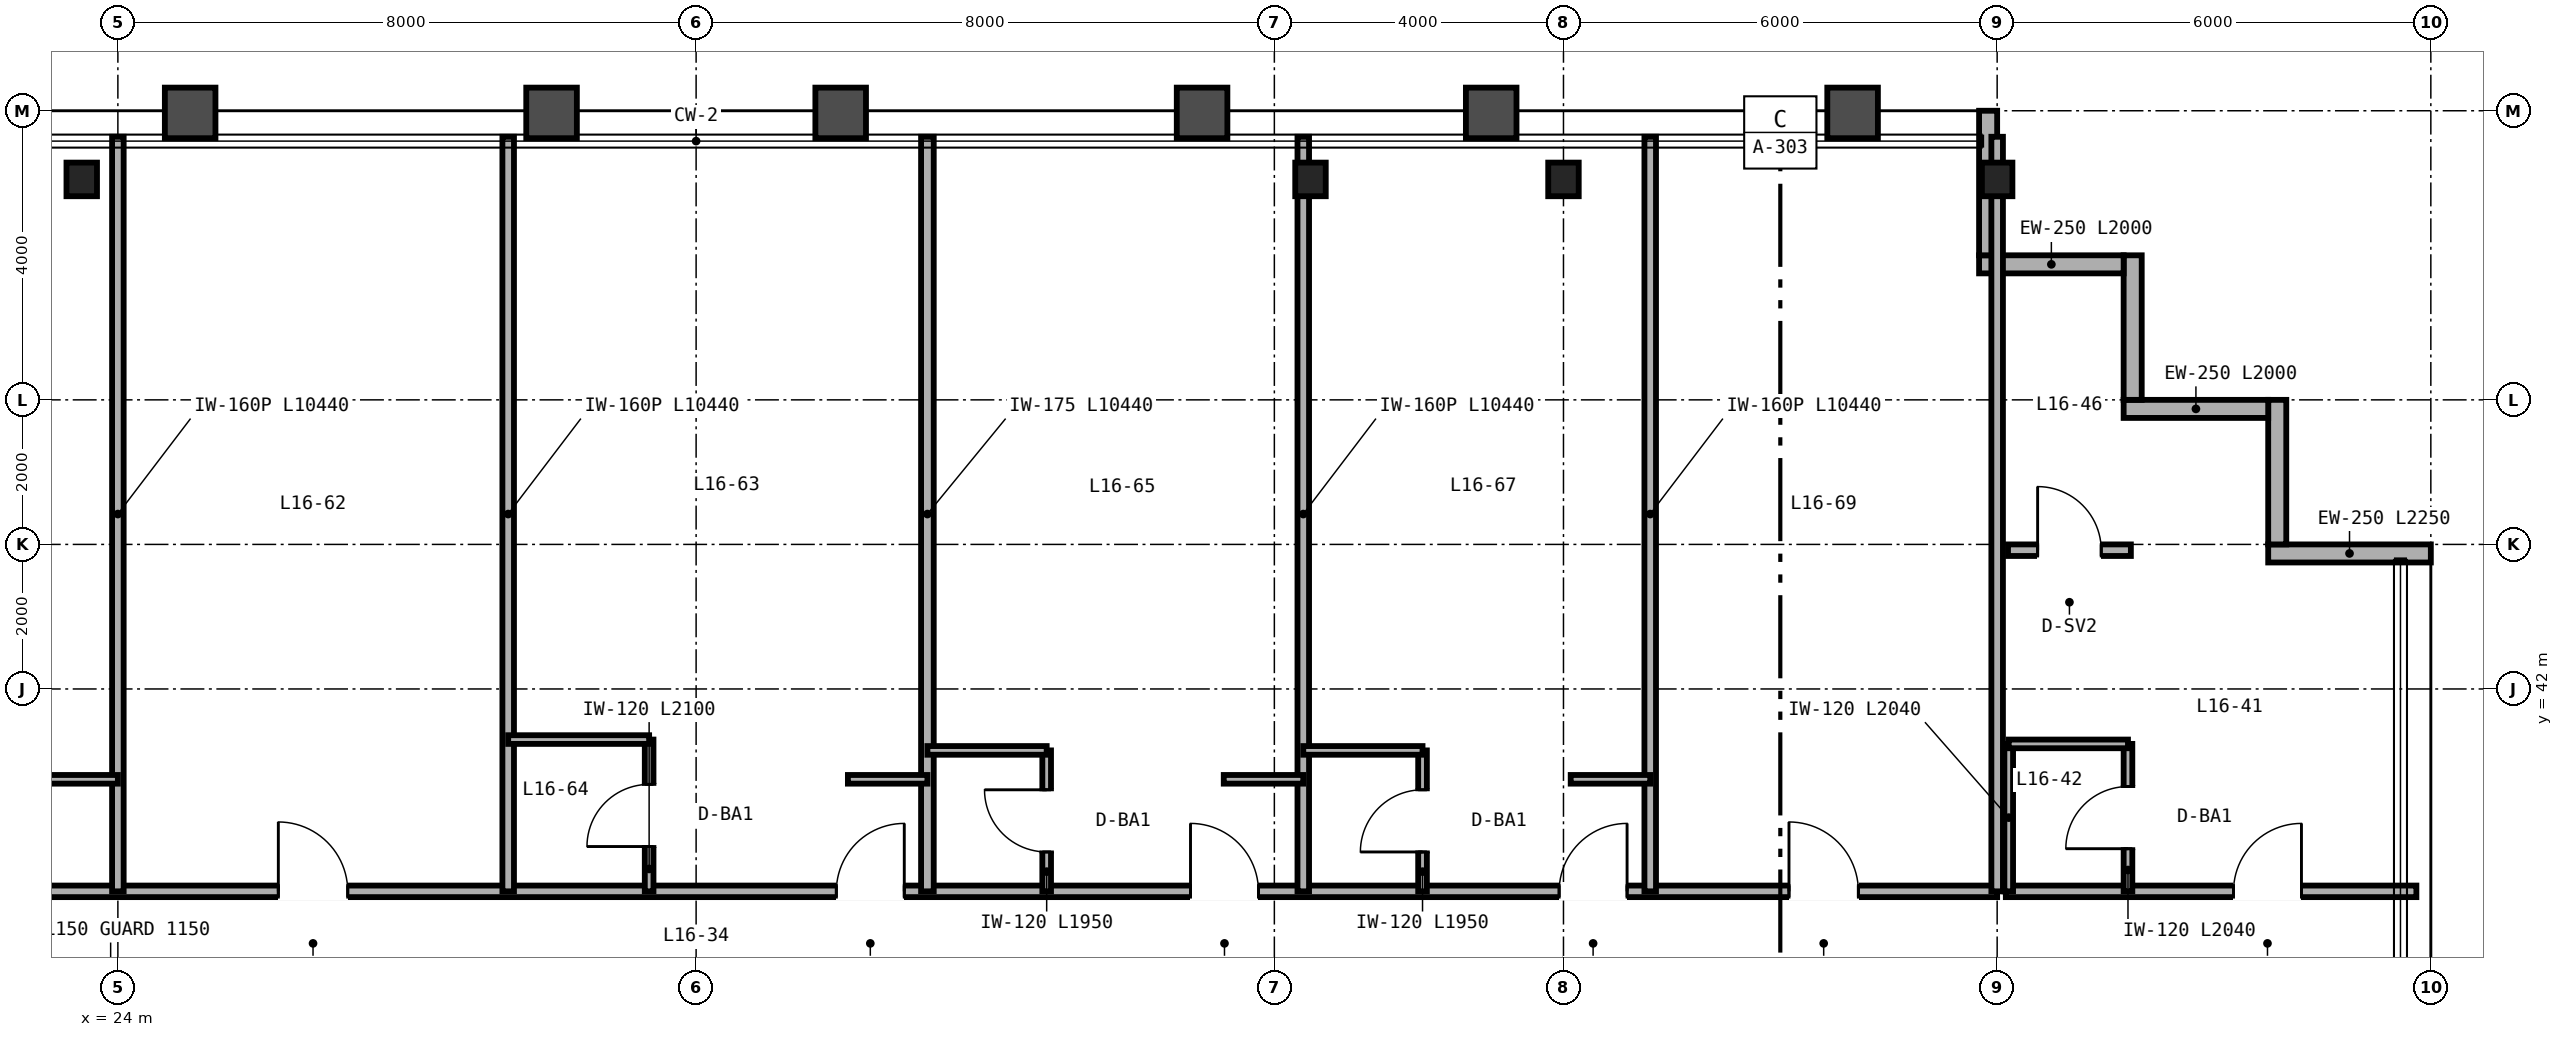
"""IFC4 building model, lengths in metres.
Left out: names, types, materials, properties, quantities, classifications, styles, units other than length and angle.
Written with IfcOpenShell. Run it as: python <this file> out.ifc"""

import sys

from ifc_helpers import new_model, si_unit, direction, frame, frame_2d, origin, origin_2d, place, context, subcontext, project, spatial, rectangle, i_section, extrude, source, transform, mapped, element, fill, save


model = new_model("IFC4")
c1 = context("Model", 3, precision=1e-05, world=origin(), true_north=direction((0.0, 1.0)))
c2 = subcontext(c1, "Body", "Model", "MODEL_VIEW")
j1 = project(units=[si_unit("LENGTHUNIT", "METRE"), si_unit("PLANEANGLEUNIT", "RADIAN")], contexts=[c1])
p1 = place(None, origin())
s1 = spatial("IfcSite", under=j1, at=p1, CompositionType="ELEMENT")
p2 = place(p1, origin())
s2 = spatial("IfcBuilding", under=s1, at=p2, CompositionType="ELEMENT")
p3 = place(p2, frame((0.0, 0.0, 67.2)))
s3 = spatial("IfcBuildingStorey", under=s2, at=p3, CompositionType="ELEMENT", Elevation=67.2)
m1 = source(origin(), c2, "Body", "SweptSolid", [
    extrude(i_section(OverallWidth=0.422, OverallDepth=0.465, WebThickness=0.045, FlangeThickness=0.073, FilletRadius=0.025, at=origin_2d()), origin(), (0.0, 0.0, 1.0), 3.35),
])
for number, where, z_axis, x_axis in (
    (1, (23.5, 49.05, 0.0), (0.0, 0.0, 1.0), (1.0, 0.0, 0.0)),
    (2, (40.5, 49.05, 0.0), (0.0, 0.0, 1.0), (1.0, 0.0, 0.0)),
    (3, (44.0, 49.05, 0.0), (0.0, 0.0, 1.0), (1.0, 0.0, 0.0)),
    (4, (50.0, 49.05, 0.0), (0.0, 0.0, 1.0), (1.0, 0.0, 0.0)),
):
    element("IfcColumn", number, at=place(p3, frame(where, z_axis=z_axis, x_axis=x_axis)), inside=s3, PredefinedType="COLUMN", context=c2, shape_type="MappedRepresentation", body=[
        mapped(m1, transform((0.0, 0.0, 0.0), scale=1.0)),
    ])
p4 = place(p3, frame((56.0, 43.875, 0.0), z_axis=(0.0, 0.0, 1.0), x_axis=(-1.0, 0.0, 0.0)))
e5 = element("IfcWall", 5, at=p4, inside=s3, PredefinedType="SOLIDWALL", context=c2, shape_type="SweptSolid", body=[
    extrude(rectangle(XDim=2.25, YDim=0.25, at=frame_2d((1.125, 0.0))), origin(), (0.0, 0.0, 1.0), 3.35),
])
for number, where, z_axis, x_axis in (
    (6, (53.875, 44.0, 0.0), (0.0, 0.0, 1.0), (0.0, 1.0, 0.0)),
    (7, (53.75, 45.875, 0.0), (0.0, 0.0, 1.0), (-1.0, 0.0, 0.0)),
    (8, (51.875, 46.0, 0.0), (0.0, 0.0, 1.0), (0.0, 1.0, 0.0)),
    (9, (51.75, 47.875, 0.0), (0.0, 0.0, 1.0), (-1.0, 0.0, 0.0)),
):
    element("IfcWall", number, at=place(p3, frame(where, z_axis=z_axis, x_axis=x_axis)), inside=s3, PredefinedType="SOLIDWALL", context=c2, shape_type="SweptSolid", body=[
        extrude(rectangle(XDim=2.0, YDim=0.25, at=frame_2d((1.0, 0.0))), origin(), (0.0, 0.0, 1.0), 3.35),
    ])
p5 = place(p3, frame((49.875, 48.0, 0.0), z_axis=(0.0, 0.0, 1.0), x_axis=(0.0, 1.0, 0.0)))
e10 = element("IfcWall", 10, at=p5, inside=s3, PredefinedType="SOLIDWALL", context=c2, shape_type="SweptSolid", body=[
    extrude(rectangle(XDim=2.0, YDim=0.25, at=frame_2d((1.0, 0.0))), origin(), (0.0, 0.0, 1.0), 2.657),
])
p6 = place(p3, frame((50.12, 39.2, 0.0), z_axis=(0.0, 0.0, 1.0), x_axis=(1.0, 0.0, 0.0)))
e11 = element("IfcWall", 11, at=p6, inside=s3, PredefinedType="PARTITIONING", context=c2, shape_type="SweptSolid", body=[
    extrude(rectangle(XDim=5.68, YDim=0.16, at=frame_2d((2.84, 0.0))), origin(), (0.0, 0.0, 1.0), 3.35),
])
p7 = place(p6, frame((3.15, 0.0, 0.0)))
e12 = element("IfcOpeningElement", 12, at=p7, cuts=e11, PredefinedType="OPENING", context=c2, shape_type="SweptSolid", body=[
    extrude(rectangle(XDim=0.94, YDim=2.15, at=frame_2d((0.47, 1.075))), frame((0.0, 0.09, 0.0), z_axis=(0.0, -1.0, 0.0), x_axis=(1.0, 0.0, 0.0)), (0.0, 0.0, 1.0), 0.18),
])
p8 = place(p3, frame((51.81, 39.2, 0.0), z_axis=(0.0, 0.0, 1.0), x_axis=(0.0, 1.0, 0.0)))
e13 = element("IfcWall", 13, at=p8, inside=s3, PredefinedType="PARTITIONING", context=c2, shape_type="SweptSolid", body=[
    extrude(rectangle(XDim=2.04, YDim=0.12, at=frame_2d((1.02, 0.0))), origin(), (0.0, 0.0, 1.0), 3.35),
])
p9 = place(p8, frame((0.59, 0.0, 0.0)))
e14 = element("IfcOpeningElement", 14, at=p9, cuts=e13, PredefinedType="OPENING", context=c2, shape_type="SweptSolid", body=[
    extrude(rectangle(XDim=0.86, YDim=2.1, at=frame_2d((0.43, 1.05))), frame((0.0, 0.07, 0.0), z_axis=(0.0, -1.0, 0.0), x_axis=(1.0, 0.0, 0.0)), (0.0, 0.0, 1.0), 0.14),
])
p10 = place(p3, frame((50.16, 39.2, 0.0), z_axis=(0.0, 0.0, 1.0), x_axis=(0.0, 1.0, 0.0)))
e15 = element("IfcWall", 15, at=p10, inside=s3, PredefinedType="PARTITIONING", context=c2, shape_type="SweptSolid", body=[
    extrude(rectangle(XDim=2.04, YDim=0.12, at=frame_2d((1.02, 0.0))), origin(), (0.0, 0.0, 1.0), 3.35),
])
p11 = place(p3, frame((50.16, 41.24, 0.0), z_axis=(0.0, 0.0, 1.0), x_axis=(1.0, 0.0, 0.0)))
e16 = element("IfcWall", 16, at=p11, inside=s3, PredefinedType="PARTITIONING", context=c2, shape_type="SweptSolid", body=[
    extrude(rectangle(XDim=1.65, YDim=0.12, at=frame_2d((0.825, 0.0))), origin(), (0.0, 0.0, 1.0), 3.35),
])
p12 = place(p3, frame((50.15, 43.92, 0.0), z_axis=(0.0, 0.0, 1.0), x_axis=(1.0, 0.0, 0.0)))
e17 = element("IfcWall", 17, at=p12, inside=s3, PredefinedType="PARTITIONING", context=c2, shape_type="SweptSolid", body=[
    extrude(rectangle(XDim=1.7, YDim=0.16, at=frame_2d((0.85, 0.0))), origin(), (0.0, 0.0, 1.0), 3.35),
])
p13 = place(p12, frame((0.41, 0.0, 0.0)))
e18 = element("IfcOpeningElement", 18, at=p13, cuts=e17, PredefinedType="OPENING", context=c2, shape_type="SweptSolid", body=[
    extrude(rectangle(XDim=0.88, YDim=2.15, at=frame_2d((0.44, 1.075))), frame((0.0, 0.09, 0.0), z_axis=(0.0, -1.0, 0.0), x_axis=(1.0, 0.0, 0.0)), (0.0, 0.0, 1.0), 0.18),
])
p14 = place(p3, frame((14.0, 39.2, 0.0), z_axis=(0.0, 0.0, 1.0), x_axis=(1.0, 0.0, 0.0)))
e19 = element("IfcWall", 19, at=p14, inside=s3, PredefinedType="PARTITIONING", context=c2, shape_type="SweptSolid", body=[
    extrude(rectangle(XDim=36.0, YDim=0.16, at=frame_2d((18.0, 0.0))), origin(), (0.0, 0.0, 1.0), 2.571),
])
p15 = place(p14, frame((3.74, 0.0, 0.0)))
e20 = element("IfcOpeningElement", 20, at=p15, cuts=e19, PredefinedType="OPENING", context=c2, shape_type="SweptSolid", body=[
    extrude(rectangle(XDim=0.94, YDim=2.15, at=frame_2d((0.47, 1.075))), frame((0.0, 0.09, 0.0), z_axis=(0.0, -1.0, 0.0), x_axis=(1.0, 0.0, 0.0)), (0.0, 0.0, 1.0), 0.18),
])
p16 = place(p14, frame((7.79, 0.0, 0.0)))
e21 = element("IfcOpeningElement", 21, at=p16, cuts=e19, PredefinedType="OPENING", context=c2, shape_type="SweptSolid", body=[
    extrude(rectangle(XDim=0.94, YDim=2.15, at=frame_2d((0.47, 1.075))), frame((0.0, 0.09, 0.0), z_axis=(0.0, -1.0, 0.0), x_axis=(1.0, 0.0, 0.0)), (0.0, 0.0, 1.0), 0.18),
])
p17 = place(p14, frame((12.22, 0.0, 0.0)))
e22 = element("IfcOpeningElement", 22, at=p17, cuts=e19, PredefinedType="OPENING", context=c2, shape_type="SweptSolid", body=[
    extrude(rectangle(XDim=0.96, YDim=2.15, at=frame_2d((0.48, 1.075))), frame((0.0, 0.09, 0.0), z_axis=(0.0, -1.0, 0.0), x_axis=(1.0, 0.0, 0.0)), (0.0, 0.0, 1.0), 0.18),
])
p18 = place(p14, frame((19.94, 0.0, 0.0)))
e23 = element("IfcOpeningElement", 23, at=p18, cuts=e19, PredefinedType="OPENING", context=c2, shape_type="SweptSolid", body=[
    extrude(rectangle(XDim=0.94, YDim=2.15, at=frame_2d((0.47, 1.075))), frame((0.0, 0.09, 0.0), z_axis=(0.0, -1.0, 0.0), x_axis=(1.0, 0.0, 0.0)), (0.0, 0.0, 1.0), 0.18),
])
p19 = place(p14, frame((24.84, 0.0, 0.0)))
e24 = element("IfcOpeningElement", 24, at=p19, cuts=e19, PredefinedType="OPENING", context=c2, shape_type="SweptSolid", body=[
    extrude(rectangle(XDim=0.94, YDim=2.15, at=frame_2d((0.47, 1.075))), frame((0.0, 0.09, 0.0), z_axis=(0.0, -1.0, 0.0), x_axis=(1.0, 0.0, 0.0)), (0.0, 0.0, 1.0), 0.18),
])
p20 = place(p14, frame((29.94, 0.0, 0.0)))
e25 = element("IfcOpeningElement", 25, at=p20, cuts=e19, PredefinedType="OPENING", context=c2, shape_type="SweptSolid", body=[
    extrude(rectangle(XDim=0.94, YDim=2.15, at=frame_2d((0.47, 1.075))), frame((0.0, 0.09, 0.0), z_axis=(0.0, -1.0, 0.0), x_axis=(1.0, 0.0, 0.0)), (0.0, 0.0, 1.0), 0.18),
])
p21 = place(p14, frame((33.12, 0.0, 0.0)))
e26 = element("IfcOpeningElement", 26, at=p21, cuts=e19, PredefinedType="OPENING", context=c2, shape_type="SweptSolid", body=[
    extrude(rectangle(XDim=0.96, YDim=2.15, at=frame_2d((0.48, 1.075))), frame((0.0, 0.09, 0.0), z_axis=(0.0, -1.0, 0.0), x_axis=(1.0, 0.0, 0.0)), (0.0, 0.0, 1.0), 0.18),
])
p22 = place(p3, frame((50.0, 39.2, 0.0), z_axis=(0.0, 0.0, 1.0), x_axis=(0.0, 1.0, 0.0)))
e27 = element("IfcWall", 27, at=p22, inside=s3, PredefinedType="PARTITIONING", context=c2, shape_type="SweptSolid", body=[
    extrude(rectangle(XDim=10.44, YDim=0.16, at=frame_2d((5.22, 0.0))), origin(), (0.0, 0.0, 1.0), 2.657),
])
p23 = place(p3, frame((24.0, 39.2, 0.0), z_axis=(0.0, 0.0, 1.0), x_axis=(0.0, 1.0, 0.0)))
e28 = element("IfcWall", 28, at=p23, inside=s3, PredefinedType="PARTITIONING", context=c2, shape_type="SweptSolid", body=[
    extrude(rectangle(XDim=10.44, YDim=0.16, at=frame_2d((5.22, 0.0))), origin(), (0.0, 0.0, 1.0), 2.423),
])
p24 = place(p3, frame((22.9, 40.75, 0.0), z_axis=(0.0, 0.0, 1.0), x_axis=(1.0, 0.0, 0.0)))
e29 = element("IfcWall", 29, at=p24, inside=s3, PredefinedType="PARTITIONING", context=c2, shape_type="SweptSolid", body=[
    extrude(rectangle(XDim=1.1, YDim=0.12, at=frame_2d((0.55, 0.0))), origin(), (0.0, 0.0, 1.0), 2.571),
])
p25 = place(p3, frame((29.4, 39.2, 0.0), z_axis=(0.0, 0.0, 1.0), x_axis=(0.0, 1.0, 0.0)))
e30 = element("IfcWall", 30, at=p25, inside=s3, PredefinedType="PARTITIONING", context=c2, shape_type="SweptSolid", body=[
    extrude(rectangle(XDim=10.44, YDim=0.16, at=frame_2d((5.22, 0.0))), origin(), (0.0, 0.0, 1.0), 2.423),
])
p26 = place(p3, frame((35.2, 39.2, 0.0), z_axis=(0.0, 0.0, 1.0), x_axis=(0.0, 1.0, 0.0)))
e31 = element("IfcWall", 31, at=p26, inside=s3, PredefinedType="PARTITIONING", context=c2, shape_type="SweptSolid", body=[
    extrude(rectangle(XDim=10.44, YDim=0.175, at=frame_2d((5.22, 0.0))), origin(), (0.0, 0.0, 1.0), 2.423),
])
p27 = place(p3, frame((31.35, 39.2, 0.0), z_axis=(0.0, 0.0, 1.0), x_axis=(0.0, 1.0, 0.0)))
e32 = element("IfcWall", 32, at=p27, inside=s3, PredefinedType="PARTITIONING", context=c2, shape_type="SweptSolid", body=[
    extrude(rectangle(XDim=2.1, YDim=0.12, at=frame_2d((1.05, 0.0))), origin(), (0.0, 0.0, 1.0), 3.35),
])
p28 = place(p27, frame((0.62, 0.0, 0.0)))
e33 = element("IfcOpeningElement", 33, at=p28, cuts=e32, PredefinedType="OPENING", context=c2, shape_type="SweptSolid", body=[
    extrude(rectangle(XDim=0.86, YDim=2.1, at=frame_2d((0.43, 1.05))), frame((0.0, 0.07, 0.0), z_axis=(0.0, -1.0, 0.0), x_axis=(1.0, 0.0, 0.0)), (0.0, 0.0, 1.0), 0.14),
])
p29 = place(p3, frame((29.4, 41.3, 0.0), z_axis=(0.0, 0.0, 1.0), x_axis=(1.0, 0.0, 0.0)))
e34 = element("IfcWall", 34, at=p29, inside=s3, PredefinedType="PARTITIONING", context=c2, shape_type="SweptSolid", body=[
    extrude(rectangle(XDim=1.95, YDim=0.12, at=frame_2d((0.975, 0.0))), origin(), (0.0, 0.0, 1.0), 3.35),
])
p30 = place(p3, frame((34.1, 40.75, 0.0), z_axis=(0.0, 0.0, 1.0), x_axis=(1.0, 0.0, 0.0)))
e35 = element("IfcWall", 35, at=p30, inside=s3, PredefinedType="PARTITIONING", context=c2, shape_type="SweptSolid", body=[
    extrude(rectangle(XDim=1.1, YDim=0.12, at=frame_2d((0.55, 0.0))), origin(), (0.0, 0.0, 1.0), 3.35),
])
p31 = place(p3, frame((40.4, 39.2, 0.0), z_axis=(0.0, 0.0, 1.0), x_axis=(0.0, 1.0, 0.0)))
e36 = element("IfcWall", 36, at=p31, inside=s3, PredefinedType="PARTITIONING", context=c2, shape_type="SweptSolid", body=[
    extrude(rectangle(XDim=10.44, YDim=0.16, at=frame_2d((5.22, 0.0))), origin(), (0.0, 0.0, 1.0), 2.423),
])
p32 = place(p3, frame((36.85, 39.2, 0.0), z_axis=(0.0, 0.0, 1.0), x_axis=(0.0, 1.0, 0.0)))
e37 = element("IfcWall", 37, at=p32, inside=s3, PredefinedType="PARTITIONING", context=c2, shape_type="SweptSolid", body=[
    extrude(rectangle(XDim=1.95, YDim=0.12, at=frame_2d((0.975, 0.0))), origin(), (0.0, 0.0, 1.0), 3.35),
])
p33 = place(p32, frame((0.545, 0.0, 0.0)))
e38 = element("IfcOpeningElement", 38, at=p33, cuts=e37, PredefinedType="OPENING", context=c2, shape_type="SweptSolid", body=[
    extrude(rectangle(XDim=0.86, YDim=2.1, at=frame_2d((0.43, 1.05))), frame((0.0, 0.07, 0.0), z_axis=(0.0, -1.0, 0.0), x_axis=(1.0, 0.0, 0.0)), (0.0, 0.0, 1.0), 0.14),
])
p34 = place(p3, frame((35.2, 41.15, 0.0), z_axis=(0.0, 0.0, 1.0), x_axis=(1.0, 0.0, 0.0)))
e39 = element("IfcWall", 39, at=p34, inside=s3, PredefinedType="PARTITIONING", context=c2, shape_type="SweptSolid", body=[
    extrude(rectangle(XDim=1.65, YDim=0.12, at=frame_2d((0.825, 0.0))), origin(), (0.0, 0.0, 1.0), 3.35),
])
p35 = place(p3, frame((39.3, 40.75, 0.0), z_axis=(0.0, 0.0, 1.0), x_axis=(1.0, 0.0, 0.0)))
e40 = element("IfcWall", 40, at=p35, inside=s3, PredefinedType="PARTITIONING", context=c2, shape_type="SweptSolid", body=[
    extrude(rectangle(XDim=1.1, YDim=0.12, at=frame_2d((0.55, 0.0))), origin(), (0.0, 0.0, 1.0), 2.571),
])
p36 = place(p3, frame((45.2, 39.2, 0.0), z_axis=(0.0, 0.0, 1.0), x_axis=(0.0, 1.0, 0.0)))
e41 = element("IfcWall", 41, at=p36, inside=s3, PredefinedType="PARTITIONING", context=c2, shape_type="SweptSolid", body=[
    extrude(rectangle(XDim=10.44, YDim=0.16, at=frame_2d((5.22, 0.0))), origin(), (0.0, 0.0, 1.0), 2.657),
])
p37 = place(p3, frame((42.05, 39.2, 0.0), z_axis=(0.0, 0.0, 1.0), x_axis=(0.0, 1.0, 0.0)))
e42 = element("IfcWall", 42, at=p37, inside=s3, PredefinedType="PARTITIONING", context=c2, shape_type="SweptSolid", body=[
    extrude(rectangle(XDim=1.95, YDim=0.12, at=frame_2d((0.975, 0.0))), origin(), (0.0, 0.0, 1.0), 3.35),
])
p38 = place(p37, frame((0.545, 0.0, 0.0)))
e43 = element("IfcOpeningElement", 43, at=p38, cuts=e42, PredefinedType="OPENING", context=c2, shape_type="SweptSolid", body=[
    extrude(rectangle(XDim=0.86, YDim=2.1, at=frame_2d((0.43, 1.05))), frame((0.0, 0.07, 0.0), z_axis=(0.0, -1.0, 0.0), x_axis=(1.0, 0.0, 0.0)), (0.0, 0.0, 1.0), 0.14),
])
p39 = place(p3, frame((40.4, 41.15, 0.0), z_axis=(0.0, 0.0, 1.0), x_axis=(1.0, 0.0, 0.0)))
e44 = element("IfcWall", 44, at=p39, inside=s3, PredefinedType="PARTITIONING", context=c2, shape_type="SweptSolid", body=[
    extrude(rectangle(XDim=1.65, YDim=0.12, at=frame_2d((0.825, 0.0))), origin(), (0.0, 0.0, 1.0), 2.571),
])
p40 = place(p3, frame((44.1, 40.75, 0.0), z_axis=(0.0, 0.0, 1.0), x_axis=(1.0, 0.0, 0.0)))
e45 = element("IfcWall", 45, at=p40, inside=s3, PredefinedType="PARTITIONING", context=c2, shape_type="SweptSolid", body=[
    extrude(rectangle(XDim=1.1, YDim=0.12, at=frame_2d((0.55, 0.0))), origin(), (0.0, 0.0, 1.0), 3.35),
])
m2 = source(origin(), c2, "Body", "SweptSolid", [
    extrude(rectangle(XDim=0.86, YDim=2.1, at=frame_2d((0.43, 1.05))), frame((0.0, 0.025, 0.0), z_axis=(0.0, -1.0, 0.0), x_axis=(1.0, 0.0, 0.0)), (0.0, 0.0, 1.0), 0.05),
])
p41 = place(p9, origin())
e46 = element("IfcDoor", 46, at=p41, inside=s3, OperationType="SINGLE_SWING_LEFT", PredefinedType="DOOR", context=c2, shape_type="MappedRepresentation", body=[
    mapped(m2, transform((0.0, 0.0, 0.0), scale=1.0)),
])
fill(e14, e46)
m3 = source(origin(), c2, "Body", "SweptSolid", [
    extrude(rectangle(XDim=0.94, YDim=2.15, at=frame_2d((0.47, 1.075))), frame((0.0, 0.025, 0.0), z_axis=(0.0, -1.0, 0.0), x_axis=(1.0, 0.0, 0.0)), (0.0, 0.0, 1.0), 0.05),
])
p42 = place(p7, origin())
e47 = element("IfcDoor", 47, at=p42, inside=s3, OperationType="SINGLE_SWING_RIGHT", PredefinedType="DOOR", context=c2, shape_type="MappedRepresentation", body=[
    mapped(m3, transform((0.0, 0.0, 0.0), scale=1.0)),
])
fill(e12, e47)
m4 = source(origin(), c2, "Body", "SweptSolid", [
    extrude(rectangle(XDim=0.88, YDim=2.15, at=frame_2d((0.44, 1.075))), frame((0.0, 0.025, 0.0), z_axis=(0.0, -1.0, 0.0), x_axis=(1.0, 0.0, 0.0)), (0.0, 0.0, 1.0), 0.05),
])
p43 = place(p13, origin())
e48 = element("IfcDoor", 48, at=p43, inside=s3, OperationType="SINGLE_SWING_LEFT", PredefinedType="DOOR", context=c2, shape_type="MappedRepresentation", body=[
    mapped(m4, transform((0.0, 0.0, 0.0), scale=1.0)),
])
fill(e18, e48)
p44 = place(p28, origin())
e49 = element("IfcDoor", 49, at=p44, inside=s3, OperationType="SINGLE_SWING_LEFT", PredefinedType="DOOR", context=c2, shape_type="MappedRepresentation", body=[
    mapped(m2, transform((0.0, 0.0, 0.0), scale=1.0)),
])
fill(e33, e49)
p45 = place(p33, origin())
e50 = element("IfcDoor", 50, at=p45, inside=s3, OperationType="SINGLE_SWING_RIGHT", PredefinedType="DOOR", context=c2, shape_type="MappedRepresentation", body=[
    mapped(m2, transform((0.0, 0.0, 0.0), scale=1.0)),
])
fill(e38, e50)
p46 = place(p38, origin())
e51 = element("IfcDoor", 51, at=p46, inside=s3, OperationType="SINGLE_SWING_LEFT", PredefinedType="DOOR", context=c2, shape_type="MappedRepresentation", body=[
    mapped(m2, transform((0.0, 0.0, 0.0), scale=1.0)),
])
fill(e43, e51)
m5 = source(origin(), c2, "Body", "SweptSolid", [
    extrude(rectangle(XDim=0.96, YDim=2.15, at=frame_2d((0.48, 1.075))), frame((0.0, 0.025, 0.0), z_axis=(0.0, -1.0, 0.0), x_axis=(1.0, 0.0, 0.0)), (0.0, 0.0, 1.0), 0.05),
])
p47 = place(p17, origin())
e52 = element("IfcDoor", 52, at=p47, inside=s3, OperationType="SINGLE_SWING_LEFT", PredefinedType="DOOR", context=c2, shape_type="MappedRepresentation", body=[
    mapped(m5, transform((0.0, 0.0, 0.0), scale=1.0)),
])
fill(e22, e52)
p48 = place(p18, origin())
e53 = element("IfcDoor", 53, at=p48, inside=s3, OperationType="SINGLE_SWING_RIGHT", PredefinedType="DOOR", context=c2, shape_type="MappedRepresentation", body=[
    mapped(m3, transform((0.0, 0.0, 0.0), scale=1.0)),
])
fill(e23, e53)
p49 = place(p19, origin())
e54 = element("IfcDoor", 54, at=p49, inside=s3, OperationType="SINGLE_SWING_LEFT", PredefinedType="DOOR", context=c2, shape_type="MappedRepresentation", body=[
    mapped(m3, transform((0.0, 0.0, 0.0), scale=1.0)),
])
fill(e24, e54)
p50 = place(p20, origin())
e55 = element("IfcDoor", 55, at=p50, inside=s3, OperationType="SINGLE_SWING_RIGHT", PredefinedType="DOOR", context=c2, shape_type="MappedRepresentation", body=[
    mapped(m3, transform((0.0, 0.0, 0.0), scale=1.0)),
])
fill(e25, e55)
p51 = place(p21, origin())
e56 = element("IfcDoor", 56, at=p51, inside=s3, OperationType="SINGLE_SWING_LEFT", PredefinedType="DOOR", context=c2, shape_type="MappedRepresentation", body=[
    mapped(m5, transform((0.0, 0.0, 0.0), scale=1.0)),
])
fill(e26, e56)
save(model, sys.argv[1])
